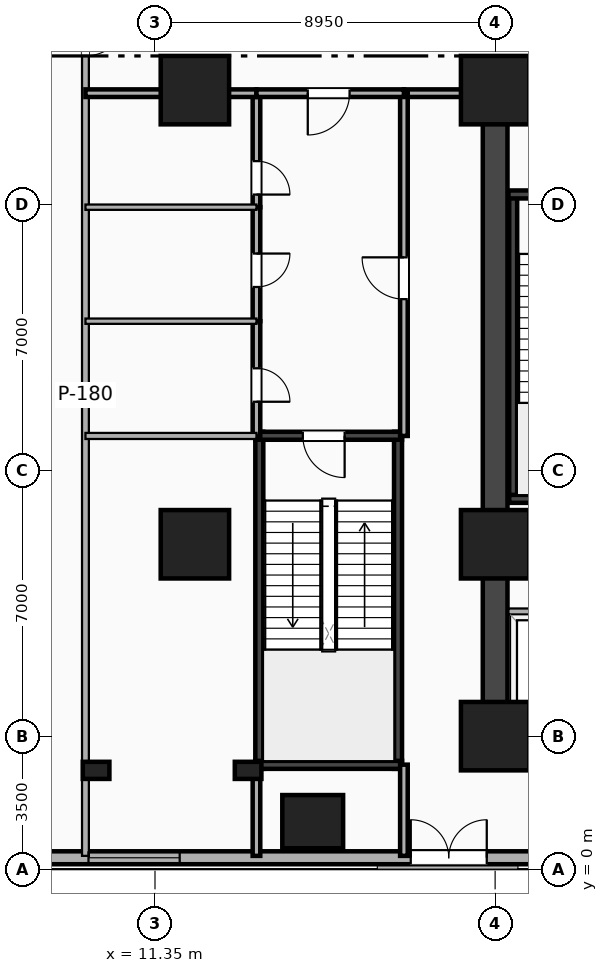
"""IFC4 building model, lengths in metres.
Left out: names, types, materials, properties, quantities, classifications, styles, units other than length and angle.
Written with IfcOpenShell. Run it as: python <this file> out.ifc"""

import sys

from ifc_helpers import new_model, si_unit, direction, frame, frame_2d, origin, origin_2d, place, context, subcontext, project, spatial, rectangle, extrude, element, fill, save


model = new_model("IFC4")
c1 = context("Model", 3, precision=1e-05, world=origin(), true_north=direction((0.0, 1.0)))
c2 = subcontext(c1, "Body", "Model", "MODEL_VIEW")
j1 = project(units=[si_unit("LENGTHUNIT", "METRE"), si_unit("PLANEANGLEUNIT", "RADIAN")], contexts=[c1])
p1 = place(None, origin())
s1 = spatial("IfcSite", under=j1, at=p1, CompositionType="ELEMENT")
p2 = place(p1, origin())
s2 = spatial("IfcBuilding", under=s1, at=p2, CompositionType="ELEMENT")
p3 = place(p2, origin())
s3 = spatial("IfcBuildingStorey", under=s2, at=p3, CompositionType="ELEMENT", Elevation=0.0)
p4 = place(p3, frame((20.3, 3.63, 0.0), z_axis=(0.0, 0.0, 1.0), x_axis=(1.0, 0.0, 0.0)))
e1 = element("IfcWall", 1, at=p4, inside=s3, PredefinedType="SHEAR", context=c2, shape_type="SweptSolid", body=[
    extrude(rectangle(XDim=24.5, YDim=0.65, at=frame_2d((12.25, 0.0))), origin(), (0.0, 0.0, 1.0), 5.1),
])
p5 = place(p4, frame((13.45, 0.0, 0.0), z_axis=(0.0, 0.0, 1.0), x_axis=(-1.0, 0.0, 0.0)))
e2 = element("IfcOpeningElement", 2, at=p5, cuts=e1, PredefinedType="OPENING", context=c2, shape_type="SweptSolid", body=[
    extrude(rectangle(XDim=1.1, YDim=2.15, at=frame_2d((0.55, 1.075))), frame((0.0, 0.335, 0.0), z_axis=(0.0, -1.0, 0.0), x_axis=(1.0, 0.0, 0.0)), (0.0, 0.0, 1.0), 0.67),
])
p6 = place(p3, frame((20.3, 3.5, 0.0), z_axis=(0.0, 0.0, 1.0), x_axis=(0.0, 1.0, 0.0)))
e3 = element("IfcWall", 3, at=p6, inside=s3, PredefinedType="SHEAR", context=c2, shape_type="SweptSolid", body=[
    extrude(rectangle(XDim=16.9, YDim=0.65, at=frame_2d((8.45, 0.0))), origin(), (0.0, 0.0, 1.0), 5.1),
])
p7 = place(p3, frame((20.775, 9.745, 0.0), z_axis=(0.0, 0.0, 1.0), x_axis=(0.0, 1.0, 0.0)))
e4 = element("IfcWall", 4, at=p7, inside=s3, PredefinedType="SHEAR", context=c2, shape_type="SweptSolid", body=[
    extrude(rectangle(XDim=8.01, YDim=0.21, at=frame_2d((4.005, 0.0))), origin(), (0.0, 0.0, 1.0), 5.1),
])
p8 = place(p3, frame((20.67, 9.745, 0.0), z_axis=(0.0, 0.0, 1.0), x_axis=(1.0, 0.0, 0.0)))
e5 = element("IfcWall", 5, at=p8, inside=s3, PredefinedType="SHEAR", context=c2, shape_type="SweptSolid", body=[
    extrude(rectangle(XDim=3.66, YDim=0.21, at=frame_2d((1.83, 0.0))), origin(), (0.0, 0.0, 1.0), 5.1),
])
p9 = place(p3, frame((20.65, 17.755, 0.0), z_axis=(0.0, 0.0, 1.0), x_axis=(1.0, 0.0, 0.0)))
e6 = element("IfcWall", 6, at=p9, inside=s3, PredefinedType="SHEAR", context=c2, shape_type="SweptSolid", body=[
    extrude(rectangle(XDim=8.3, YDim=0.21, at=frame_2d((4.15, 0.0))), origin(), (0.0, 0.0, 1.0), 5.1),
])
p10 = place(p9, frame((1.15, 0.0, 0.0)))
e7 = element("IfcOpeningElement", 7, at=p10, cuts=e6, PredefinedType="OPENING", context=c2, shape_type="SweptSolid", body=[
    extrude(rectangle(XDim=1.05, YDim=2.15, at=frame_2d((0.525, 1.075))), frame((0.0, 0.115, 0.0), z_axis=(0.0, -1.0, 0.0), x_axis=(1.0, 0.0, 0.0)), (0.0, 0.0, 1.0), 0.23),
])
p11 = place(p9, frame((4.15, 0.0, 0.0)))
e8 = element("IfcOpeningElement", 8, at=p11, cuts=e6, PredefinedType="OPENING", context=c2, shape_type="SweptSolid", body=[
    extrude(rectangle(XDim=1.1, YDim=2.18, at=frame_2d((0.55, 1.09))), frame((0.0, 0.115, 0.0), z_axis=(0.0, -1.0, 0.0), x_axis=(1.0, 0.0, 0.0)), (0.0, 0.0, 1.0), 0.23),
])
p12 = place(p9, frame((6.45, 0.0, 0.0)))
e9 = element("IfcOpeningElement", 9, at=p12, cuts=e6, PredefinedType="OPENING", context=c2, shape_type="SweptSolid", body=[
    extrude(rectangle(XDim=1.12, YDim=2.2, at=frame_2d((0.56, 1.1))), frame((0.0, 0.115, 0.0), z_axis=(0.0, -1.0, 0.0), x_axis=(1.0, 0.0, 0.0)), (0.0, 0.0, 1.0), 0.23),
])
for number, where, z_axis, x_axis in (
    (10, (14.095, 2.64, 0.0), (0.0, 0.0, 1.0), (0.0, 1.0, 0.0)),
    (11, (17.745, 2.64, 0.0), (0.0, 0.0, 1.0), (0.0, 1.0, 0.0)),
):
    element("IfcWall", number, at=place(p3, frame(where, z_axis=z_axis, x_axis=x_axis)), inside=s3, PredefinedType="SHEAR", context=c2, shape_type="SweptSolid", body=[
        extrude(rectangle(XDim=8.87, YDim=0.21, at=frame_2d((4.435, 0.0))), origin(), (0.0, 0.0, 1.0), 5.1),
    ])
p13 = place(p3, frame((13.99, 2.745, 0.0), z_axis=(0.0, 0.0, 1.0), x_axis=(1.0, 0.0, 0.0)))
e12 = element("IfcWall", 12, at=p13, inside=s3, PredefinedType="SHEAR", context=c2, shape_type="SweptSolid", body=[
    extrude(rectangle(XDim=3.86, YDim=0.21, at=frame_2d((1.93, 0.0))), origin(), (0.0, 0.0, 1.0), 5.1),
])
p14 = place(p3, frame((13.99, 11.405, 0.0), z_axis=(0.0, 0.0, 1.0), x_axis=(1.0, 0.0, 0.0)))
e13 = element("IfcWall", 13, at=p14, inside=s3, PredefinedType="SHEAR", context=c2, shape_type="SweptSolid", body=[
    extrude(rectangle(XDim=3.86, YDim=0.21, at=frame_2d((1.93, 0.0))), origin(), (0.0, 0.0, 1.0), 5.1),
])
p15 = place(p14, frame((1.25, 0.0, 0.0)))
e14 = element("IfcOpeningElement", 14, at=p15, cuts=e13, PredefinedType="OPENING", context=c2, shape_type="SweptSolid", body=[
    extrude(rectangle(XDim=1.1, YDim=2.15, at=frame_2d((0.55, 1.075))), frame((0.0, 0.115, 0.0), z_axis=(0.0, -1.0, 0.0), x_axis=(1.0, 0.0, 0.0)), (0.0, 0.0, 1.0), 0.23),
])
for number, where, z_axis, x_axis in (
    (15, (9.8, 2.6, -0.35), (0.0, 0.0, 1.0), (1.0, 0.0, 0.0)),
    (16, (13.8, 2.6, -0.35), (0.0, 0.0, 1.0), (1.0, 0.0, 0.0)),
):
    element("IfcColumn", number, at=place(p3, frame(where, z_axis=z_axis, x_axis=x_axis)), inside=s3, PredefinedType="PILASTER", context=c2, shape_type="SweptSolid", body=[
        extrude(rectangle(XDim=0.7, YDim=0.45, at=origin_2d()), origin(), (0.0, 0.0, 1.0), 5.45),
    ])
for number, where, z_axis, x_axis in (
    (17, (20.3, 3.5, -0.35), (0.0, 0.0, 1.0), (1.0, 0.0, 0.0)),
    (18, (20.3, 8.55, -0.35), (0.0, 0.0, 1.0), (1.0, 0.0, 0.0)),
    (19, (20.3, 20.5, -0.35), (0.0, 0.0, 1.0), (1.0, 0.0, 0.0)),
    (20, (12.4, 8.55, -0.35), (0.0, 0.0, 1.0), (1.0, 0.0, 0.0)),
    (21, (12.4, 20.5, -0.35), (0.0, 0.0, 1.0), (1.0, 0.0, 0.0)),
):
    element("IfcColumn", number, at=place(p3, frame(where, z_axis=z_axis, x_axis=x_axis)), inside=s3, PredefinedType="COLUMN", context=c2, shape_type="SweptSolid", body=[
        extrude(rectangle(XDim=1.8, YDim=1.8, at=origin_2d()), origin(), (0.0, 0.0, 1.0), 5.45),
    ])
p16 = place(p3, frame((15.5, 1.25, -0.35), z_axis=(0.0, 0.0, 1.0), x_axis=(1.0, 0.0, 0.0)))
e22 = element("IfcColumn", 22, at=p16, inside=s3, PredefinedType="COLUMN", context=c2, shape_type="SweptSolid", body=[
    extrude(rectangle(XDim=1.6, YDim=1.4, at=origin_2d()), origin(), (0.0, 0.0, 1.0), 5.45),
])
p17 = place(p3, frame((-4.7, 0.3, 0.0), z_axis=(0.0, 0.0, 1.0), x_axis=(1.0, 0.0, 0.0)))
e23 = element("IfcWall", 23, at=p17, inside=s3, PredefinedType="SOLIDWALL", context=c2, shape_type="SweptSolid", body=[
    extrude(rectangle(XDim=83.4, YDim=0.34, at=frame_2d((41.7, 0.0))), origin(), (0.0, 0.0, 1.0), 5.1),
])
p18 = place(p17, frame((24.78, 0.0, 0.0), z_axis=(0.0, 0.0, 1.0), x_axis=(-1.0, 0.0, 0.0)))
e24 = element("IfcOpeningElement", 24, at=p18, cuts=e23, PredefinedType="OPENING", context=c2, shape_type="SweptSolid", body=[
    extrude(rectangle(XDim=2.0, YDim=2.4, at=frame_2d((1.0, 1.2))), frame((0.0, 0.18, 0.0), z_axis=(0.0, -1.0, 0.0), x_axis=(1.0, 0.0, 0.0)), (0.0, 0.0, 1.0), 0.36),
])
p19 = place(p17, frame((38.85, 0.0, 0.0), z_axis=(0.0, 0.0, 1.0), x_axis=(-1.0, 0.0, 0.0)))
e25 = element("IfcOpeningElement", 25, at=p19, cuts=e23, PredefinedType="OPENING", context=c2, shape_type="SweptSolid", body=[
    extrude(rectangle(XDim=2.0, YDim=2.4, at=frame_2d((1.0, 1.2))), frame((0.0, 0.18, 0.0), z_axis=(0.0, -1.0, 0.0), x_axis=(1.0, 0.0, 0.0)), (0.0, 0.0, 1.0), 0.36),
])
p20 = place(p17, frame((57.35, 0.0, 0.0), z_axis=(0.0, 0.0, 1.0), x_axis=(-1.0, 0.0, 0.0)))
e26 = element("IfcOpeningElement", 26, at=p20, cuts=e23, PredefinedType="OPENING", context=c2, shape_type="SweptSolid", body=[
    extrude(rectangle(XDim=2.0, YDim=2.4, at=frame_2d((1.0, 1.2))), frame((0.0, 0.18, 0.0), z_axis=(0.0, -1.0, 0.0), x_axis=(1.0, 0.0, 0.0)), (0.0, 0.0, 1.0), 0.36),
])
p21 = place(p17, frame((81.0, 0.0, 0.0), z_axis=(0.0, 0.0, 1.0), x_axis=(-1.0, 0.0, 0.0)))
e27 = element("IfcOpeningElement", 27, at=p21, cuts=e23, PredefinedType="OPENING", context=c2, shape_type="SweptSolid", body=[
    extrude(rectangle(XDim=3.8, YDim=3.4, at=frame_2d((1.9, 1.7))), frame((0.0, 0.18, 0.0), z_axis=(0.0, -1.0, 0.0), x_axis=(1.0, 0.0, 0.0)), (0.0, 0.0, 1.0), 0.36),
])
p22 = place(p17, frame((9.9, 0.0, 0.9)))
e28 = element("IfcOpeningElement", 28, at=p22, cuts=e23, PredefinedType="OPENING", context=c2, shape_type="SweptSolid", body=[
    extrude(rectangle(XDim=2.4, YDim=2.6, at=frame_2d((1.2, 1.3))), frame((0.0, 0.18, 0.0), z_axis=(0.0, -1.0, 0.0), x_axis=(1.0, 0.0, 0.0)), (0.0, 0.0, 1.0), 0.36),
])
p23 = place(p17, frame((14.3, 0.0, 0.9)))
e29 = element("IfcOpeningElement", 29, at=p23, cuts=e23, PredefinedType="OPENING", context=c2, shape_type="SweptSolid", body=[
    extrude(rectangle(XDim=2.4, YDim=2.6, at=frame_2d((1.2, 1.3))), frame((0.0, 0.18, 0.0), z_axis=(0.0, -1.0, 0.0), x_axis=(1.0, 0.0, 0.0)), (0.0, 0.0, 1.0), 0.36),
])
p24 = place(p17, frame((27.5, 0.0, 0.9)))
e30 = element("IfcOpeningElement", 30, at=p24, cuts=e23, PredefinedType="OPENING", context=c2, shape_type="SweptSolid", body=[
    extrude(rectangle(XDim=2.4, YDim=2.6, at=frame_2d((1.2, 1.3))), frame((0.0, 0.18, 0.0), z_axis=(0.0, -1.0, 0.0), x_axis=(1.0, 0.0, 0.0)), (0.0, 0.0, 1.0), 0.36),
])
p25 = place(p17, frame((45.9, 0.0, 0.9)))
e31 = element("IfcOpeningElement", 31, at=p25, cuts=e23, PredefinedType="OPENING", context=c2, shape_type="SweptSolid", body=[
    extrude(rectangle(XDim=2.4, YDim=2.6, at=frame_2d((1.2, 1.3))), frame((0.0, 0.18, 0.0), z_axis=(0.0, -1.0, 0.0), x_axis=(1.0, 0.0, 0.0)), (0.0, 0.0, 1.0), 0.36),
])
p26 = place(p17, frame((61.5, 0.0, 0.9)))
e32 = element("IfcOpeningElement", 32, at=p26, cuts=e23, PredefinedType="OPENING", context=c2, shape_type="SweptSolid", body=[
    extrude(rectangle(XDim=2.4, YDim=2.6, at=frame_2d((1.2, 1.3))), frame((0.0, 0.18, 0.0), z_axis=(0.0, -1.0, 0.0), x_axis=(1.0, 0.0, 0.0)), (0.0, 0.0, 1.0), 0.36),
])
p27 = place(p17, frame((68.3, 0.0, 0.9)))
e33 = element("IfcOpeningElement", 33, at=p27, cuts=e23, PredefinedType="OPENING", context=c2, shape_type="SweptSolid", body=[
    extrude(rectangle(XDim=2.4, YDim=2.6, at=frame_2d((1.2, 1.3))), frame((0.0, 0.18, 0.0), z_axis=(0.0, -1.0, 0.0), x_axis=(1.0, 0.0, 0.0)), (0.0, 0.0, 1.0), 0.36),
])
p28 = place(p3, frame((20.65, 20.42, 0.0), z_axis=(0.0, 0.0, 1.0), x_axis=(1.0, 0.0, 0.0)))
e34 = element("IfcWall", 34, at=p28, inside=s3, PredefinedType="PARTITIONING", context=c2, shape_type="SweptSolid", body=[
    extrude(rectangle(XDim=5.73, YDim=0.2, at=frame_2d((2.865, 0.0))), origin(), (0.0, 0.0, 1.0), 2.735),
])
p29 = place(p28, frame((2.3, 0.0, 0.0)))
e35 = element("IfcOpeningElement", 35, at=p29, cuts=e34, PredefinedType="OPENING", context=c2, shape_type="SweptSolid", body=[
    extrude(rectangle(XDim=1.1, YDim=2.15, at=frame_2d((0.55, 1.075))), frame((0.0, 0.11, 0.0), z_axis=(0.0, -1.0, 0.0), x_axis=(1.0, 0.0, 0.0)), (0.0, 0.0, 1.0), 0.22),
])
p30 = place(p3, frame((20.65, 6.78, 0.0), z_axis=(0.0, 0.0, 1.0), x_axis=(1.0, 0.0, 0.0)))
e36 = element("IfcWall", 36, at=p30, inside=s3, PredefinedType="PARTITIONING", context=c2, shape_type="SweptSolid", body=[
    extrude(rectangle(XDim=8.3, YDim=0.16, at=frame_2d((4.15, 0.0))), origin(), (0.0, 0.0, 1.0), 4.23),
])
p31 = place(p30, frame((3.695, 0.0, 0.0)))
e37 = element("IfcOpeningElement", 37, at=p31, cuts=e36, PredefinedType="OPENING", context=c2, shape_type="SweptSolid", body=[
    extrude(rectangle(XDim=1.15, YDim=2.2, at=frame_2d((0.575, 1.1))), frame((0.0, 0.09, 0.0), z_axis=(0.0, -1.0, 0.0), x_axis=(1.0, 0.0, 0.0)), (0.0, 0.0, 1.0), 0.18),
])
p32 = place(p30, frame((5.492, 0.0, 0.0)))
e38 = element("IfcOpeningElement", 38, at=p32, cuts=e36, PredefinedType="OPENING", context=c2, shape_type="SweptSolid", body=[
    extrude(rectangle(XDim=1.15, YDim=2.2, at=frame_2d((0.575, 1.1))), frame((0.0, 0.09, 0.0), z_axis=(0.0, -1.0, 0.0), x_axis=(1.0, 0.0, 0.0)), (0.0, 0.0, 1.0), 0.18),
])
p33 = place(p30, frame((1.059, 0.0, 0.0)))
e39 = element("IfcOpeningElement", 39, at=p33, cuts=e36, PredefinedType="OPENING", context=c2, shape_type="SweptSolid", body=[
    extrude(rectangle(XDim=1.15, YDim=2.2, at=frame_2d((0.575, 1.1))), frame((0.0, 0.09, 0.0), z_axis=(0.0, -1.0, 0.0), x_axis=(1.0, 0.0, 0.0)), (0.0, 0.0, 1.0), 0.18),
])
p34 = place(p3, frame((17.9, 20.42, 0.0), z_axis=(0.0, 0.0, 1.0), x_axis=(1.0, 0.0, 0.0)))
e40 = element("IfcWall", 40, at=p34, inside=s3, PredefinedType="PARTITIONING", context=c2, shape_type="SweptSolid", body=[
    extrude(rectangle(XDim=2.4, YDim=0.2, at=frame_2d((1.2, 0.0))), origin(), (0.0, 0.0, 1.0), 2.735),
])
p35 = place(p3, frame((9.52, 0.35, 0.0), z_axis=(0.0, 0.0, 1.0), x_axis=(0.0, 1.0, 0.0)))
e41 = element("IfcWall", 41, at=p35, inside=s3, PredefinedType="PARTITIONING", context=c2, shape_type="SweptSolid", body=[
    extrude(rectangle(XDim=22.9, YDim=0.18, at=frame_2d((11.45, 0.0))), origin(), (0.0, 0.0, 1.0), 5.1),
])
p36 = place(p35, frame((21.05, 0.0, 0.0)))
e42 = element("IfcOpeningElement", 42, at=p36, cuts=e41, PredefinedType="OPENING", context=c2, shape_type="SweptSolid", body=[
    extrude(rectangle(XDim=1.1, YDim=2.15, at=frame_2d((0.55, 1.075))), frame((0.0, 0.1, 0.0), z_axis=(0.0, -1.0, 0.0), x_axis=(1.0, 0.0, 0.0)), (0.0, 0.0, 1.0), 0.2),
])
p37 = place(p3, frame((14.02, 11.4, 0.0), z_axis=(0.0, 0.0, 1.0), x_axis=(0.0, 1.0, 0.0)))
e43 = element("IfcWall", 43, at=p37, inside=s3, PredefinedType="PARTITIONING", context=c2, shape_type="SweptSolid", body=[
    extrude(rectangle(XDim=3.02, YDim=0.2, at=frame_2d((1.51, 0.0))), origin(), (0.0, 0.0, 1.0), 5.1),
])
p38 = place(p37, frame((0.9, 0.0, 0.0)))
e44 = element("IfcOpeningElement", 44, at=p38, cuts=e43, PredefinedType="OPENING", context=c2, shape_type="SweptSolid", body=[
    extrude(rectangle(XDim=0.88, YDim=2.08, at=frame_2d((0.44, 1.04))), frame((0.0, 0.11, 0.0), z_axis=(0.0, -1.0, 0.0), x_axis=(1.0, 0.0, 0.0)), (0.0, 0.0, 1.0), 0.22),
])
p39 = place(p3, frame((14.02, 14.42, 0.0), z_axis=(0.0, 0.0, 1.0), x_axis=(0.0, 1.0, 0.0)))
e45 = element("IfcWall", 45, at=p39, inside=s3, PredefinedType="PARTITIONING", context=c2, shape_type="SweptSolid", body=[
    extrude(rectangle(XDim=3.0, YDim=0.2, at=frame_2d((1.5, 0.0))), origin(), (0.0, 0.0, 1.0), 5.1),
])
p40 = place(p39, frame((0.9, 0.0, 0.0)))
e46 = element("IfcOpeningElement", 46, at=p40, cuts=e45, PredefinedType="OPENING", context=c2, shape_type="SweptSolid", body=[
    extrude(rectangle(XDim=0.88, YDim=2.08, at=frame_2d((0.44, 1.04))), frame((0.0, 0.11, 0.0), z_axis=(0.0, -1.0, 0.0), x_axis=(1.0, 0.0, 0.0)), (0.0, 0.0, 1.0), 0.22),
])
p41 = place(p3, frame((14.02, 17.42, 0.0), z_axis=(0.0, 0.0, 1.0), x_axis=(0.0, 1.0, 0.0)))
e47 = element("IfcWall", 47, at=p41, inside=s3, PredefinedType="PARTITIONING", context=c2, shape_type="SweptSolid", body=[
    extrude(rectangle(XDim=3.0, YDim=0.2, at=frame_2d((1.5, 0.0))), origin(), (0.0, 0.0, 1.0), 4.164),
])
p42 = place(p41, frame((0.332, 0.0, 0.0)))
e48 = element("IfcOpeningElement", 48, at=p42, cuts=e47, PredefinedType="OPENING", context=c2, shape_type="SweptSolid", body=[
    extrude(rectangle(XDim=0.88, YDim=2.08, at=frame_2d((0.44, 1.04))), frame((0.0, 0.11, 0.0), z_axis=(0.0, -1.0, 0.0), x_axis=(1.0, 0.0, 0.0)), (0.0, 0.0, 1.0), 0.22),
])
p43 = place(p3, frame((14.02, 0.35, 0.0), z_axis=(0.0, 0.0, 1.0), x_axis=(0.0, 1.0, 0.0)))
e49 = element("IfcWall", 49, at=p43, inside=s3, PredefinedType="PARTITIONING", context=c2, shape_type="SweptSolid", body=[
    extrude(rectangle(XDim=2.4, YDim=0.2, at=frame_2d((1.2, 0.0))), origin(), (0.0, 0.0, 1.0), 5.1),
])
for number, where, z_axis, x_axis in (
    (50, (9.52, 14.42, 0.0), (0.0, 0.0, 1.0), (1.0, 0.0, 0.0)),
    (51, (9.52, 17.42, 0.0), (0.0, 0.0, 1.0), (1.0, 0.0, 0.0)),
):
    element("IfcWall", number, at=place(p3, frame(where, z_axis=z_axis, x_axis=x_axis)), inside=s3, PredefinedType="PARTITIONING", context=c2, shape_type="SweptSolid", body=[
        extrude(rectangle(XDim=4.5, YDim=0.14, at=frame_2d((2.25, 0.0))), origin(), (0.0, 0.0, 1.0), 4.23),
    ])
p44 = place(p3, frame((9.52, 11.4, 0.0), z_axis=(0.0, 0.0, 1.0), x_axis=(1.0, 0.0, 0.0)))
e52 = element("IfcWall", 52, at=p44, inside=s3, PredefinedType="PARTITIONING", context=c2, shape_type="SweptSolid", body=[
    extrude(rectangle(XDim=4.5, YDim=0.16, at=frame_2d((2.25, 0.0))), origin(), (0.0, 0.0, 1.0), 4.23),
])
p45 = place(p3, frame((17.9, 11.4, 0.0), z_axis=(0.0, 0.0, 1.0), x_axis=(0.0, 1.0, 0.0)))
e53 = element("IfcWall", 53, at=p45, inside=s3, PredefinedType="PARTITIONING", context=c2, shape_type="SweptSolid", body=[
    extrude(rectangle(XDim=9.02, YDim=0.2, at=frame_2d((4.51, 0.0))), origin(), (0.0, 0.0, 1.0), 4.164),
])
p46 = place(p45, frame((4.7, 0.0, 0.0), z_axis=(0.0, 0.0, 1.0), x_axis=(-1.0, 0.0, 0.0)))
e54 = element("IfcOpeningElement", 54, at=p46, cuts=e53, PredefinedType="OPENING", context=c2, shape_type="SweptSolid", body=[
    extrude(rectangle(XDim=1.1, YDim=2.15, at=frame_2d((0.55, 1.075))), frame((0.0, 0.11, 0.0), z_axis=(0.0, -1.0, 0.0), x_axis=(1.0, 0.0, 0.0)), (0.0, 0.0, 1.0), 0.22),
])
p47 = place(p3, frame((17.9, 0.35, 0.0), z_axis=(0.0, 0.0, 1.0), x_axis=(0.0, 1.0, 0.0)))
e55 = element("IfcWall", 55, at=p47, inside=s3, PredefinedType="PARTITIONING", context=c2, shape_type="SweptSolid", body=[
    extrude(rectangle(XDim=2.4, YDim=0.2, at=frame_2d((1.2, 0.0))), origin(), (0.0, 0.0, 1.0), 4.164),
])
p48 = place(p3, frame((9.52, 20.42, 0.0), z_axis=(0.0, 0.0, 1.0), x_axis=(1.0, 0.0, 0.0)))
e56 = element("IfcWall", 56, at=p48, inside=s3, PredefinedType="PARTITIONING", context=c2, shape_type="SweptSolid", body=[
    extrude(rectangle(XDim=4.5, YDim=0.2, at=frame_2d((2.25, 0.0))), origin(), (0.0, 0.0, 1.0), 4.164),
])
p49 = place(p3, frame((14.02, 20.42, 0.0), z_axis=(0.0, 0.0, 1.0), x_axis=(1.0, 0.0, 0.0)))
e57 = element("IfcWall", 57, at=p49, inside=s3, PredefinedType="PARTITIONING", context=c2, shape_type="SweptSolid", body=[
    extrude(rectangle(XDim=3.88, YDim=0.2, at=frame_2d((1.94, 0.0))), origin(), (0.0, 0.0, 1.0), 4.164),
])
p50 = place(p49, frame((1.35, 0.0, 0.0)))
e58 = element("IfcOpeningElement", 58, at=p50, cuts=e57, PredefinedType="OPENING", context=c2, shape_type="SweptSolid", body=[
    extrude(rectangle(XDim=1.1, YDim=2.15, at=frame_2d((0.55, 1.075))), frame((0.0, 0.11, 0.0), z_axis=(0.0, -1.0, 0.0), x_axis=(1.0, 0.0, 0.0)), (0.0, 0.0, 1.0), 0.22),
])
p51 = place(p18, origin())
e59 = element("IfcDoor", 59, at=p51, inside=s3, OperationType="DOUBLE_DOOR_SINGLE_SWING", PredefinedType="DOOR", context=c2, shape_type="SweptSolid", body=[
    extrude(rectangle(XDim=2.0, YDim=2.4, at=frame_2d((1.0, 1.2))), frame((0.0, 0.025, 0.0), z_axis=(0.0, -1.0, 0.0), x_axis=(1.0, 0.0, 0.0)), (0.0, 0.0, 1.0), 0.05),
])
fill(e24, e59)
p52 = place(p23, origin())
e60 = element("IfcWindow", 60, at=p52, inside=s3, PartitioningType="SINGLE_PANEL", PredefinedType="WINDOW", context=c2, shape_type="SweptSolid", body=[
    extrude(rectangle(XDim=2.4, YDim=2.6, at=frame_2d((1.2, 1.3))), frame((0.0, 0.03, 0.0), z_axis=(0.0, -1.0, 0.0), x_axis=(1.0, 0.0, 0.0)), (0.0, 0.0, 1.0), 0.06),
])
fill(e29, e60)
p53 = place(p15, origin())
e61 = element("IfcDoor", 61, at=p53, inside=s3, OperationType="SINGLE_SWING_RIGHT", PredefinedType="DOOR", context=c2, shape_type="SweptSolid", body=[
    extrude(rectangle(XDim=1.1, YDim=2.15, at=frame_2d((0.55, 1.075))), frame((0.0, 0.025, 0.0), z_axis=(0.0, -1.0, 0.0), x_axis=(1.0, 0.0, 0.0)), (0.0, 0.0, 1.0), 0.05),
])
fill(e14, e61)
p54 = place(p36, origin())
e62 = element("IfcDoor", 62, at=p54, inside=s3, OperationType="SINGLE_SWING_RIGHT", PredefinedType="DOOR", context=c2, shape_type="SweptSolid", body=[
    extrude(rectangle(XDim=1.1, YDim=2.15, at=frame_2d((0.55, 1.075))), frame((0.0, 0.025, 0.0), z_axis=(0.0, -1.0, 0.0), x_axis=(1.0, 0.0, 0.0)), (0.0, 0.0, 1.0), 0.05),
])
fill(e42, e62)
p55 = place(p38, origin())
e63 = element("IfcDoor", 63, at=p55, inside=s3, OperationType="SINGLE_SWING_LEFT", PredefinedType="DOOR", context=c2, shape_type="SweptSolid", body=[
    extrude(rectangle(XDim=0.88, YDim=2.08, at=frame_2d((0.44, 1.04))), frame((0.0, 0.025, 0.0), z_axis=(0.0, -1.0, 0.0), x_axis=(1.0, 0.0, 0.0)), (0.0, 0.0, 1.0), 0.05),
])
fill(e44, e63)
p56 = place(p40, origin())
e64 = element("IfcDoor", 64, at=p56, inside=s3, OperationType="SINGLE_SWING_RIGHT", PredefinedType="DOOR", context=c2, shape_type="SweptSolid", body=[
    extrude(rectangle(XDim=0.88, YDim=2.08, at=frame_2d((0.44, 1.04))), frame((0.0, 0.025, 0.0), z_axis=(0.0, -1.0, 0.0), x_axis=(1.0, 0.0, 0.0)), (0.0, 0.0, 1.0), 0.05),
])
fill(e46, e64)
p57 = place(p42, origin())
e65 = element("IfcDoor", 65, at=p57, inside=s3, OperationType="SINGLE_SWING_LEFT", PredefinedType="DOOR", context=c2, shape_type="SweptSolid", body=[
    extrude(rectangle(XDim=0.88, YDim=2.08, at=frame_2d((0.44, 1.04))), frame((0.0, 0.025, 0.0), z_axis=(0.0, -1.0, 0.0), x_axis=(1.0, 0.0, 0.0)), (0.0, 0.0, 1.0), 0.05),
])
fill(e48, e65)
p58 = place(p46, origin())
e66 = element("IfcDoor", 66, at=p58, inside=s3, OperationType="SINGLE_SWING_RIGHT", PredefinedType="DOOR", context=c2, shape_type="SweptSolid", body=[
    extrude(rectangle(XDim=1.1, YDim=2.15, at=frame_2d((0.55, 1.075))), frame((0.0, 0.025, 0.0), z_axis=(0.0, -1.0, 0.0), x_axis=(1.0, 0.0, 0.0)), (0.0, 0.0, 1.0), 0.05),
])
fill(e54, e66)
p59 = place(p50, origin())
e67 = element("IfcDoor", 67, at=p59, inside=s3, OperationType="SINGLE_SWING_LEFT", PredefinedType="DOOR", context=c2, shape_type="SweptSolid", body=[
    extrude(rectangle(XDim=1.1, YDim=2.15, at=frame_2d((0.55, 1.075))), frame((0.0, 0.025, 0.0), z_axis=(0.0, -1.0, 0.0), x_axis=(1.0, 0.0, 0.0)), (0.0, 0.0, 1.0), 0.05),
])
fill(e58, e67)
save(model, sys.argv[1])
